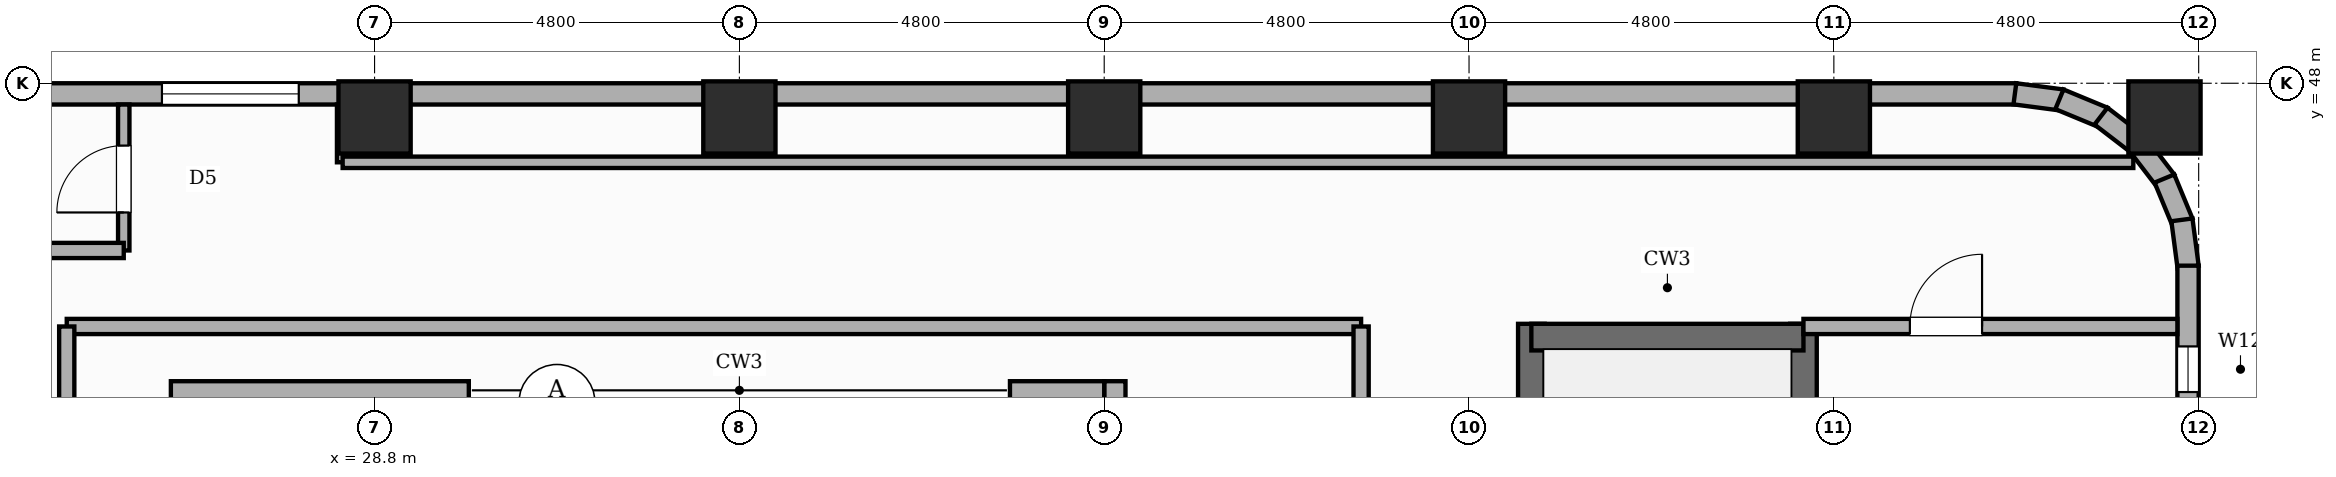
"""IFC4 building model, lengths in metres.
Left out: names, types, materials, properties, quantities, classifications, styles, units other than length and angle.
Written with IfcOpenShell. Run it as: python <this file> out.ifc"""

import sys

from ifc_helpers import new_model, si_unit, direction, frame, frame_2d, origin, origin_2d, place, context, subcontext, project, spatial, rectangle, extrude, element, fill, save


model = new_model("IFC4")
c1 = context("Model", 3, precision=1e-05, world=origin(), true_north=direction((0.0, 1.0)))
c2 = subcontext(c1, "Body", "Model", "MODEL_VIEW")
j1 = project(units=[si_unit("LENGTHUNIT", "METRE"), si_unit("PLANEANGLEUNIT", "RADIAN")], contexts=[c1])
p1 = place(None, origin())
s1 = spatial("IfcSite", under=j1, at=p1, CompositionType="ELEMENT")
p2 = place(p1, origin())
s2 = spatial("IfcBuilding", under=s1, at=p2, CompositionType="ELEMENT")
p3 = place(p2, frame((0.0, 0.0, 193.6)))
s3 = spatial("IfcBuildingStorey", under=s2, at=p3, CompositionType="ELEMENT", Elevation=193.6)
p4 = place(p3, frame((44.02, 35.865, 0.0), z_axis=(0.0, 0.0, 1.0), x_axis=(0.0, 1.0, 0.0)))
e1 = element("IfcWall", 1, at=p4, inside=s3, PredefinedType="SHEAR", context=c2, shape_type="SweptSolid", body=[
    extrude(rectangle(XDim=8.97, YDim=0.35, at=frame_2d((4.485, 0.0))), origin(), (0.0, 0.0, 1.0), 4.8),
])
p5 = place(p4, frame((0.65, 0.0, 0.0)))
e2 = element("IfcOpeningElement", 2, at=p5, cuts=e1, PredefinedType="OPENING", context=c2, shape_type="SweptSolid", body=[
    extrude(rectangle(XDim=0.95, YDim=2.1, at=frame_2d((0.475, 1.05))), frame((0.0, 0.185, 0.0), z_axis=(0.0, -1.0, 0.0), x_axis=(1.0, 0.0, 0.0)), (0.0, 0.0, 1.0), 0.37),
])
p6 = place(p3, frame((47.6, 35.865, 0.0), z_axis=(0.0, 0.0, 1.0), x_axis=(0.0, 1.0, 0.0)))
e3 = element("IfcWall", 3, at=p6, inside=s3, PredefinedType="SHEAR", context=c2, shape_type="SweptSolid", body=[
    extrude(rectangle(XDim=8.97, YDim=0.35, at=frame_2d((4.485, 0.0))), origin(), (0.0, 0.0, 1.0), 4.8),
])
p7 = place(p3, frame((44.02, 44.66, 0.0), z_axis=(0.0, 0.0, 1.0), x_axis=(1.0, 0.0, 0.0)))
e4 = element("IfcWall", 4, at=p7, inside=s3, PredefinedType="SHEAR", context=c2, shape_type="SweptSolid", body=[
    extrude(rectangle(XDim=3.58, YDim=0.35, at=frame_2d((1.79, 0.0))), origin(), (0.0, 0.0, 1.0), 4.8),
])
for number, where, z_axis, x_axis in (
    (5, (28.8, 47.55, 0.0), (0.0, 0.0, 1.0), (1.0, 0.0, 0.0)),
    (6, (33.6, 47.55, 0.0), (0.0, 0.0, 1.0), (1.0, 0.0, 0.0)),
    (7, (38.4, 47.55, 0.0), (0.0, 0.0, 1.0), (1.0, 0.0, 0.0)),
    (8, (43.2, 47.55, 0.0), (0.0, 0.0, 1.0), (1.0, 0.0, 0.0)),
    (9, (48.0, 47.55, 0.0), (0.0, 0.0, 1.0), (1.0, 0.0, 0.0)),
    (10, (52.35, 47.55, 0.0), (0.0, 0.0, 1.0), (1.0, 0.0, 0.0)),
):
    element("IfcColumn", number, at=place(p3, frame(where, z_axis=z_axis, x_axis=x_axis)), inside=s3, PredefinedType="COLUMN", context=c2, shape_type="SweptSolid", body=[
        extrude(rectangle(XDim=0.95, YDim=0.95, at=origin_2d()), origin(), (0.0, 0.0, 1.0), 4.8),
    ])
p8 = place(p3, frame((7.2, 47.86, 0.0), z_axis=(0.0, 0.0, 1.0), x_axis=(1.0, 0.0, 0.0)))
e11 = element("IfcWall", 11, at=p8, inside=s3, PredefinedType="STANDARD", context=c2, shape_type="SweptSolid", body=[
    extrude(rectangle(XDim=43.2, YDim=0.28, at=frame_2d((21.6, 0.0))), origin(), (0.0, 0.0, 1.0), 3.78),
])
p9 = place(p8, frame((18.802, 0.0, 0.8)))
e12 = element("IfcOpeningElement", 12, at=p9, cuts=e11, PredefinedType="OPENING", context=c2, shape_type="SweptSolid", body=[
    extrude(rectangle(XDim=1.8, YDim=2.1, at=frame_2d((0.9, 1.05))), frame((0.0, 0.15, 0.0), z_axis=(0.0, -1.0, 0.0), x_axis=(1.0, 0.0, 0.0)), (0.0, 0.0, 1.0), 0.3),
])
p10 = place(p8, frame((0.383, 0.0, 0.8)))
e13 = element("IfcOpeningElement", 13, at=p10, cuts=e11, PredefinedType="OPENING", context=c2, shape_type="SweptSolid", body=[
    extrude(rectangle(XDim=1.2, YDim=1.8, at=frame_2d((0.6, 0.9))), frame((0.0, 0.15, 0.0), z_axis=(0.0, -1.0, 0.0), x_axis=(1.0, 0.0, 0.0)), (0.0, 0.0, 1.0), 0.3),
])
p11 = place(p8, frame((9.722, 0.0, 0.8)))
e14 = element("IfcOpeningElement", 14, at=p11, cuts=e11, PredefinedType="OPENING", context=c2, shape_type="SweptSolid", body=[
    extrude(rectangle(XDim=1.5, YDim=2.1, at=frame_2d((0.75, 1.05))), frame((0.0, 0.15, 0.0), z_axis=(0.0, -1.0, 0.0), x_axis=(1.0, 0.0, 0.0)), (0.0, 0.0, 1.0), 0.3),
])
p12 = place(p3, frame((50.382, 47.861, 0.0), z_axis=(0.0, 0.0, 1.0), x_axis=(0.991447664465, -0.130504898859, 0.0)))
e15 = element("IfcWall", 15, at=p12, inside=s3, PredefinedType="STANDARD", context=c2, shape_type="SweptSolid", body=[
    extrude(rectangle(XDim=0.627, YDim=0.28, at=frame_2d((0.313, 0.0))), origin(), (0.0, 0.0, 1.0), 3.78),
])
for number, where, z_axis, x_axis in (
    (16, (50.968, 47.789, 0.0), (0.0, 0.0, 1.0), (0.924, -0.382, 0.0)),
    (17, (51.515, 47.567, 0.0), (0.0, 0.0, 1.0), (0.793, -0.609, 0.0)),
    (18, (51.986, 47.212, 0.0), (0.0, 0.0, 1.0), (0.609, -0.793, 0.0)),
    (19, (52.349, 46.746, 0.0), (0.0, 0.0, 1.0), (0.383, -0.924, 0.0)),
    (20, (52.579, 46.203, 0.0), (0.0, 0.0, 1.0), (0.131, -0.991, 0.0)),
):
    element("IfcWall", number, at=place(p3, frame(where, z_axis=z_axis, x_axis=x_axis)), inside=s3, PredefinedType="STANDARD", context=c2, shape_type="SweptSolid", body=[
        extrude(rectangle(XDim=0.626, YDim=0.28, at=frame_2d((0.313, 0.0))), origin(), (0.0, 0.0, 1.0), 3.78),
    ])
p13 = place(p3, frame((52.66, 45.6, 0.0), z_axis=(0.0, 0.0, 1.0), x_axis=(0.0, -1.0, 0.0)))
e21 = element("IfcWall", 21, at=p13, inside=s3, PredefinedType="STANDARD", context=c2, shape_type="SweptSolid", body=[
    extrude(rectangle(XDim=14.4, YDim=0.28, at=frame_2d((7.2, 0.0))), origin(), (0.0, 0.0, 1.0), 3.78),
])
p14 = place(p13, frame((1.062, 0.0, 0.45)))
e22 = element("IfcOpeningElement", 22, at=p14, cuts=e21, PredefinedType="OPENING", context=c2, shape_type="SweptSolid", body=[
    extrude(rectangle(XDim=0.6, YDim=1.8, at=frame_2d((0.3, 0.9))), frame((0.0, 0.15, 0.0), z_axis=(0.0, -1.0, 0.0), x_axis=(1.0, 0.0, 0.0)), (0.0, 0.0, 1.0), 0.3),
])
p15 = place(p13, frame((9.093, 0.0, 0.8)))
e23 = element("IfcOpeningElement", 23, at=p15, cuts=e21, PredefinedType="OPENING", context=c2, shape_type="SweptSolid", body=[
    extrude(rectangle(XDim=1.8, YDim=2.1, at=frame_2d((0.9, 1.05))), frame((0.0, 0.15, 0.0), z_axis=(0.0, -1.0, 0.0), x_axis=(1.0, 0.0, 0.0)), (0.0, 0.0, 1.0), 0.3),
])
p16 = place(p3, frame((38.54, 28.8, 0.0), z_axis=(0.0, 0.0, 1.0), x_axis=(0.0, 1.0, 0.0)))
e24 = element("IfcWall", 24, at=p16, inside=s3, PredefinedType="STANDARD", context=c2, shape_type="SweptSolid", body=[
    extrude(rectangle(XDim=15.28, YDim=0.28, at=frame_2d((7.64, 0.0))), origin(), (0.0, 0.0, 1.0), 4.5),
])
p17 = place(p16, frame((3.685, 0.0, 0.8)))
e25 = element("IfcOpeningElement", 25, at=p17, cuts=e24, PredefinedType="OPENING", context=c2, shape_type="SweptSolid", body=[
    extrude(rectangle(XDim=1.8, YDim=2.1, at=frame_2d((0.9, 1.05))), frame((0.0, 0.15, 0.0), z_axis=(0.0, -1.0, 0.0), x_axis=(1.0, 0.0, 0.0)), (0.0, 0.0, 1.0), 0.3),
])
p18 = place(p16, frame((10.75, 0.0, 0.8)))
e26 = element("IfcOpeningElement", 26, at=p18, cuts=e24, PredefinedType="OPENING", context=c2, shape_type="SweptSolid", body=[
    extrude(rectangle(XDim=1.8, YDim=2.1, at=frame_2d((0.9, 1.05))), frame((0.0, 0.15, 0.0), z_axis=(0.0, -1.0, 0.0), x_axis=(1.0, 0.0, 0.0)), (0.0, 0.0, 1.0), 0.3),
])
p19 = place(p3, frame((38.4, 43.94, 0.0), z_axis=(0.0, 0.0, 1.0), x_axis=(-1.0, 0.0, 0.0)))
e27 = element("IfcWall", 27, at=p19, inside=s3, PredefinedType="STANDARD", context=c2, shape_type="SweptSolid", body=[
    extrude(rectangle(XDim=1.24, YDim=0.28, at=frame_2d((0.62, 0.0))), origin(), (0.0, 0.0, 1.0), 4.5),
])
p20 = place(p3, frame((30.04, 43.94, 0.0), z_axis=(0.0, 0.0, 1.0), x_axis=(-1.0, 0.0, 0.0)))
e28 = element("IfcWall", 28, at=p20, inside=s3, PredefinedType="STANDARD", context=c2, shape_type="SweptSolid", body=[
    extrude(rectangle(XDim=3.92, YDim=0.28, at=frame_2d((1.96, 0.0))), origin(), (0.0, 0.0, 1.0), 4.5),
])
p21 = place(p3, frame((25.5, 45.8, 0.0), z_axis=(0.0, 0.0, 1.0), x_axis=(0.0, 1.0, 0.0)))
e29 = element("IfcWall", 29, at=p21, inside=s3, PredefinedType="PARTITIONING", context=c2, shape_type="SweptSolid", body=[
    extrude(rectangle(XDim=1.92, YDim=0.15, at=frame_2d((0.96, 0.0))), origin(), (0.0, 0.0, 1.0), 4.5),
])
p22 = place(p21, frame((0.5, 0.0, 0.0)))
e30 = element("IfcOpeningElement", 30, at=p22, cuts=e29, PredefinedType="OPENING", context=c2, shape_type="SweptSolid", body=[
    extrude(rectangle(XDim=0.88, YDim=2.1, at=frame_2d((0.44, 1.05))), frame((0.0, 0.085, 0.0), z_axis=(0.0, -1.0, 0.0), x_axis=(1.0, 0.0, 0.0)), (0.0, 0.0, 1.0), 0.17),
])
p23 = place(p3, frame((28.38, 46.96, 0.0), z_axis=(0.0, 0.0, 1.0), x_axis=(0.0, 1.0, 0.0)))
e31 = element("IfcWall", 31, at=p23, inside=s3, PredefinedType="PARTITIONING", context=c2, shape_type="SweptSolid", body=[
    extrude(rectangle(XDim=0.76, YDim=0.15, at=frame_2d((0.38, 0.0))), origin(), (0.0, 0.0, 1.0), 4.5),
])
p24 = place(p3, frame((22.75, 45.8, 0.0), z_axis=(0.0, 0.0, 1.0), x_axis=(1.0, 0.0, 0.0)))
e32 = element("IfcWall", 32, at=p24, inside=s3, PredefinedType="PARTITIONING", context=c2, shape_type="SweptSolid", body=[
    extrude(rectangle(XDim=2.75, YDim=0.2, at=frame_2d((1.375, 0.0))), origin(), (0.0, 0.0, 1.0), 4.5),
])
p25 = place(p3, frame((24.75, 44.8, 0.0), z_axis=(0.0, 0.0, 1.0), x_axis=(1.0, 0.0, 0.0)))
e33 = element("IfcWall", 33, at=p25, inside=s3, PredefinedType="PARTITIONING", context=c2, shape_type="SweptSolid", body=[
    extrude(rectangle(XDim=17.03, YDim=0.2, at=frame_2d((8.515, 0.0))), origin(), (0.0, 0.0, 1.0), 4.5),
])
p26 = place(p3, frame((47.6, 44.8, 0.0), z_axis=(0.0, 0.0, 1.0), x_axis=(1.0, 0.0, 0.0)))
e34 = element("IfcWall", 34, at=p26, inside=s3, PredefinedType="PARTITIONING", context=c2, shape_type="SweptSolid", body=[
    extrude(rectangle(XDim=4.92, YDim=0.2, at=frame_2d((2.46, 0.0))), origin(), (0.0, 0.0, 1.0), 4.5),
])
p27 = place(p26, frame((1.4, 0.0, 0.0)))
e35 = element("IfcOpeningElement", 35, at=p27, cuts=e34, PredefinedType="OPENING", context=c2, shape_type="SweptSolid", body=[
    extrude(rectangle(XDim=0.95, YDim=2.15, at=frame_2d((0.475, 1.075))), frame((0.0, 0.11, 0.0), z_axis=(0.0, -1.0, 0.0), x_axis=(1.0, 0.0, 0.0)), (0.0, 0.0, 1.0), 0.22),
])
p28 = place(p3, frame((24.75, 40.6, 0.0), z_axis=(0.0, 0.0, 1.0), x_axis=(0.0, 1.0, 0.0)))
e36 = element("IfcWall", 36, at=p28, inside=s3, PredefinedType="PARTITIONING", context=c2, shape_type="SweptSolid", body=[
    extrude(rectangle(XDim=4.2, YDim=0.2, at=frame_2d((2.1, 0.0))), origin(), (0.0, 0.0, 1.0), 4.5),
])
p29 = place(p28, frame((1.0, 0.0, 0.0)))
e37 = element("IfcOpeningElement", 37, at=p29, cuts=e36, PredefinedType="OPENING", context=c2, shape_type="SweptSolid", body=[
    extrude(rectangle(XDim=0.88, YDim=2.1, at=frame_2d((0.44, 1.05))), frame((0.0, 0.11, 0.0), z_axis=(0.0, -1.0, 0.0), x_axis=(1.0, 0.0, 0.0)), (0.0, 0.0, 1.0), 0.22),
])
p30 = place(p3, frame((41.78, 36.05, 0.0), z_axis=(0.0, 0.0, 1.0), x_axis=(0.0, 1.0, 0.0)))
e38 = element("IfcWall", 38, at=p30, inside=s3, PredefinedType="PARTITIONING", context=c2, shape_type="SweptSolid", body=[
    extrude(rectangle(XDim=8.75, YDim=0.2, at=frame_2d((4.375, 0.0))), origin(), (0.0, 0.0, 1.0), 4.5),
])
p31 = place(p30, frame((3.2, 0.0, 0.0)))
e39 = element("IfcOpeningElement", 39, at=p31, cuts=e38, PredefinedType="OPENING", context=c2, shape_type="SweptSolid", body=[
    extrude(rectangle(XDim=0.95, YDim=2.15, at=frame_2d((0.475, 1.075))), frame((0.0, 0.11, 0.0), z_axis=(0.0, -1.0, 0.0), x_axis=(1.0, 0.0, 0.0)), (0.0, 0.0, 1.0), 0.22),
])
p32 = place(p3, frame((28.38, 46.96, 0.0), z_axis=(0.0, 0.0, 1.0), x_axis=(1.0, 0.0, 0.0)))
e40 = element("IfcWall", 40, at=p32, inside=s3, PredefinedType="PARTITIONING", context=c2, shape_type="SweptSolid", body=[
    extrude(rectangle(XDim=23.56, YDim=0.15, at=frame_2d((11.78, 0.0))), origin(), (0.0, 0.0, 1.0), 4.5),
])
p33 = place(p9, origin())
e41 = element("IfcWindow", 41, at=p33, inside=s3, PartitioningType="SINGLE_PANEL", PredefinedType="WINDOW", context=c2, shape_type="SweptSolid", body=[
    extrude(rectangle(XDim=1.8, YDim=2.1, at=frame_2d((0.9, 1.05))), frame((0.0, 0.03, 0.0), z_axis=(0.0, -1.0, 0.0), x_axis=(1.0, 0.0, 0.0)), (0.0, 0.0, 1.0), 0.06),
])
fill(e12, e41)
p34 = place(p14, origin())
e42 = element("IfcWindow", 42, at=p34, inside=s3, PartitioningType="SINGLE_PANEL", PredefinedType="WINDOW", context=c2, shape_type="SweptSolid", body=[
    extrude(rectangle(XDim=0.6, YDim=1.8, at=frame_2d((0.3, 0.9))), frame((0.0, 0.03, 0.0), z_axis=(0.0, -1.0, 0.0), x_axis=(1.0, 0.0, 0.0)), (0.0, 0.0, 1.0), 0.06),
])
fill(e22, e42)
p35 = place(p22, origin())
e43 = element("IfcDoor", 43, at=p35, inside=s3, OperationType="SINGLE_SWING_LEFT", PredefinedType="DOOR", context=c2, shape_type="SweptSolid", body=[
    extrude(rectangle(XDim=0.88, YDim=2.1, at=frame_2d((0.44, 1.05))), frame((0.0, 0.025, 0.0), z_axis=(0.0, -1.0, 0.0), x_axis=(1.0, 0.0, 0.0)), (0.0, 0.0, 1.0), 0.05),
])
fill(e30, e43)
p36 = place(p27, origin())
e44 = element("IfcDoor", 44, at=p36, inside=s3, OperationType="SINGLE_SWING_RIGHT", PredefinedType="DOOR", context=c2, shape_type="SweptSolid", body=[
    extrude(rectangle(XDim=0.95, YDim=2.15, at=frame_2d((0.475, 1.075))), frame((0.0, 0.025, 0.0), z_axis=(0.0, -1.0, 0.0), x_axis=(1.0, 0.0, 0.0)), (0.0, 0.0, 1.0), 0.05),
])
fill(e35, e44)
save(model, sys.argv[1])
